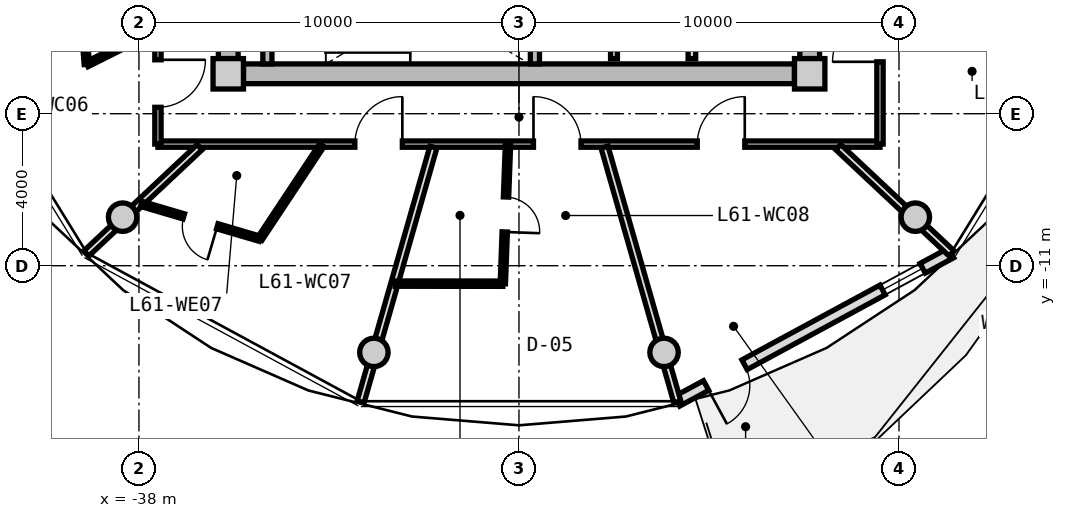
"""IFC4 building model, lengths in metres.
Left out: names, types, materials, properties, quantities, classifications, styles, units other than length and angle.
Written with IfcOpenShell. Run it as: python <this file> out.ifc"""

import sys

from ifc_helpers import new_model, si_unit, direction, frame, frame_2d, origin, origin_2d, place, context, subcontext, project, spatial, rectangle, circle, extrude, source, transform, mapped, element, fill, save


model = new_model("IFC4")
c1 = context("Model", 3, precision=1e-05, world=origin(), true_north=direction((0.0, 1.0)))
c2 = subcontext(c1, "Body", "Model", "MODEL_VIEW")
j1 = project(units=[si_unit("LENGTHUNIT", "METRE"), si_unit("PLANEANGLEUNIT", "RADIAN")], contexts=[c1])
p1 = place(None, origin())
s1 = spatial("IfcSite", under=j1, at=p1, CompositionType="ELEMENT")
p2 = place(p1, origin())
s2 = spatial("IfcBuilding", under=s1, at=p2, CompositionType="ELEMENT")
p3 = place(p2, frame((0.0, 0.0, 196.75)))
s3 = spatial("IfcBuildingStorey", under=s2, at=p3, CompositionType="ELEMENT", Elevation=196.75)
m1 = source(origin(), c2, "Body", "SweptSolid", [
    extrude(rectangle(XDim=0.8, YDim=0.8, at=origin_2d()), origin(), (0.0, 0.0, 1.0), 3.05),
])
for number, where, z_axis, x_axis in (
    (1, (-35.65, -5.95, 0.0), (0.0, 0.0, 1.0), (1.0, 0.0, 0.0)),
    (2, (-20.35, -5.95, 0.0), (0.0, 0.0, 1.0), (1.0, 0.0, 0.0)),
):
    element("IfcColumn", number, at=place(p3, frame(where, z_axis=z_axis, x_axis=x_axis)), inside=s3, PredefinedType="COLUMN", context=c2, shape_type="MappedRepresentation", body=[
        mapped(m1, transform((0.0, 0.0, 0.0), x_axis=(1.0, 0.0, 0.0), y_axis=(0.0, 1.0, 0.0), z_axis=(0.0, 0.0, 1.0), scale=1.0)),
    ])
m2 = source(origin(), c2, "Body", "SweptSolid", [
    extrude(rectangle(XDim=14.5, YDim=0.52, at=frame_2d((7.25, 0.0))), origin(), (0.0, 0.0, 1.0), 2.76),
])
p4 = place(p3, frame((-20.75, -5.95, 0.0), z_axis=(0.0, 0.0, 1.0), x_axis=(-1.0, 0.0, 0.0)))
e3 = element("IfcWall", 3, at=p4, inside=s3, PredefinedType="SHEAR", context=c2, shape_type="MappedRepresentation", body=[
    mapped(m2, transform((0.0, 0.0, 0.0), x_axis=(1.0, 0.0, 0.0), y_axis=(0.0, 1.0, 0.0), z_axis=(0.0, 0.0, 1.0), scale=1.0)),
])
m3 = source(origin(), c2, "Body", "SweptSolid", [
    extrude(rectangle(XDim=11.1, YDim=0.52, at=frame_2d((5.55, 0.0))), origin(), (0.0, 0.0, 1.0), 2.76),
])
p5 = place(p3, frame((-35.65, -5.55, 0.0), z_axis=(0.0, 0.0, 1.0), x_axis=(0.0, 1.0, 0.0)))
e4 = element("IfcWall", 4, at=p5, inside=s3, PredefinedType="SHEAR", context=c2, shape_type="MappedRepresentation", body=[
    mapped(m3, transform((0.0, 0.0, 0.0), x_axis=(1.0, 0.0, 0.0), y_axis=(0.0, 1.0, 0.0), z_axis=(0.0, 0.0, 1.0), scale=1.0)),
])
p6 = place(p5, frame((3.8, 0.0, 0.0)))
e5 = element("IfcOpeningElement", 5, at=p6, cuts=e4, PredefinedType="OPENING", context=c2, shape_type="SweptSolid", body=[
    extrude(rectangle(XDim=1.2, YDim=2.15, at=frame_2d((0.6, 1.075))), frame((0.0, 0.27, 0.0), z_axis=(0.0, -1.0, 0.0), x_axis=(1.0, 0.0, 0.0)), (0.0, 0.0, 1.0), 0.54),
])
p7 = place(p3, frame((-20.35, 5.55, 0.0), z_axis=(0.0, 0.0, 1.0), x_axis=(0.0, -1.0, 0.0)))
e6 = element("IfcWall", 6, at=p7, inside=s3, PredefinedType="SHEAR", context=c2, shape_type="MappedRepresentation", body=[
    mapped(m3, transform((0.0, 0.0, 0.0), x_axis=(1.0, 0.0, 0.0), y_axis=(0.0, 1.0, 0.0), z_axis=(0.0, 0.0, 1.0), scale=1.0)),
])
p8 = place(p7, frame((5.65, 0.0, 0.0)))
e7 = element("IfcOpeningElement", 7, at=p8, cuts=e6, PredefinedType="OPENING", context=c2, shape_type="SweptSolid", body=[
    extrude(rectangle(XDim=1.2, YDim=2.15, at=frame_2d((0.6, 1.075))), frame((0.0, 0.27, 0.0), z_axis=(0.0, -1.0, 0.0), x_axis=(1.0, 0.0, 0.0)), (0.0, 0.0, 1.0), 0.54),
])
m4 = source(origin(), c2, "Body", "SweptSolid", [
    extrude(circle(Radius=0.375, at=origin_2d()), origin(), (0.0, 0.0, 1.0), 3.05),
])
for number, where, z_axis, x_axis in (
    (8, (-38.43, -9.723, 0.0), (0.0, 0.0, 1.0), (1.0, 0.0, 0.0)),
    (9, (-31.818, -13.281, 0.0), (0.0, 0.0, 1.0), (1.0, 0.0, 0.0)),
    (10, (-24.182, -13.281, 0.0), (0.0, 0.0, 1.0), (1.0, 0.0, 0.0)),
    (11, (-17.57, -9.723, 0.0), (0.0, 0.0, 1.0), (1.0, 0.0, 0.0)),
):
    element("IfcColumn", number, at=place(p3, frame(where, z_axis=z_axis, x_axis=x_axis)), inside=s3, PredefinedType="COLUMN", context=c2, shape_type="MappedRepresentation", body=[
        mapped(m4, transform((0.0, 0.0, 0.0), x_axis=(1.0, 0.0, 0.0), y_axis=(0.0, 1.0, 0.0), z_axis=(0.0, 0.0, 1.0), scale=1.0)),
    ])
m5 = source(origin(), c2, "Body", "SweptSolid", [
    extrude(rectangle(XDim=8.197, YDim=0.29, at=frame_2d((4.099, 0.0))), origin(), (0.0, 0.0, 1.0), 2.76),
])
p9 = place(p3, frame((-16.63, -10.663, 0.0), z_axis=(0.0, 0.0, 1.0), x_axis=(-0.879369910001, -0.476139224791, 0.0)))
e12 = element("IfcWall", 12, at=p9, inside=s3, PredefinedType="SOLIDWALL", context=c2, shape_type="MappedRepresentation", body=[
    mapped(m5, transform((0.0, 0.0, 0.0), x_axis=(1.0, 0.0, 0.0), y_axis=(0.0, 1.0, 0.0), z_axis=(0.0, 0.0, 1.0), scale=1.0)),
])
p10 = place(p9, frame((6.18, 0.0, 0.0)))
e13 = element("IfcOpeningElement", 13, at=p10, cuts=e12, PredefinedType="OPENING", context=c2, shape_type="SweptSolid", body=[
    extrude(rectangle(XDim=1.15, YDim=2.25, at=frame_2d((0.575, 1.125))), frame((0.0, 0.155, 0.0), z_axis=(0.0, -1.0, 0.0), x_axis=(1.0, 0.0, 0.0)), (0.0, 0.0, 1.0), 0.31),
])
p11 = place(p9, frame((0.85, 0.0, 0.85)))
e14 = element("IfcOpeningElement", 14, at=p11, cuts=e12, PredefinedType="OPENING", context=c2, shape_type="SweptSolid", body=[
    extrude(rectangle(XDim=1.2, YDim=1.5, at=frame_2d((0.6, 0.75))), frame((0.0, 0.155, 0.0), z_axis=(0.0, -1.0, 0.0), x_axis=(1.0, 0.0, 0.0)), (0.0, 0.0, 1.0), 0.31),
])
m6 = source(origin(), c2, "Body", "SweptSolid", [
    extrude(rectangle(XDim=3.24, YDim=0.24, at=frame_2d((1.62, 0.0))), origin(), (0.0, 0.0, 1.0), 2.76),
])
for number, where, z_axis, x_axis in (
    (15, (-34.62, -5.69, 0.0), (0.0, 0.0, 1.0), (0.0, 1.0, 0.0)),
    (16, (-27.58, -5.69, 0.0), (0.0, 0.0, 1.0), (0.0, 1.0, 0.0)),
):
    element("IfcWall", number, at=place(p3, frame(where, z_axis=z_axis, x_axis=x_axis)), inside=s3, PredefinedType="PARTITIONING", context=c2, shape_type="MappedRepresentation", body=[
        mapped(m6, transform((0.0, 0.0, 0.0), x_axis=(1.0, 0.0, 0.0), y_axis=(0.0, 1.0, 0.0), z_axis=(0.0, 0.0, 1.0), scale=1.0)),
    ])
m7 = source(origin(), c2, "Body", "SweptSolid", [
    extrude(rectangle(XDim=3.8, YDim=0.2, at=frame_2d((1.9, 0.0))), origin(), (0.0, 0.0, 1.0), 2.745),
])
p12 = place(p3, frame((-23.45, -5.55, 0.0), z_axis=(0.0, 0.0, 1.0), x_axis=(0.0, 1.0, 0.0)))
e17 = element("IfcWall", 17, at=p12, inside=s3, PredefinedType="PARTITIONING", context=c2, shape_type="MappedRepresentation", body=[
    mapped(m7, transform((0.0, 0.0, 0.0), x_axis=(1.0, 0.0, 0.0), y_axis=(0.0, 1.0, 0.0), z_axis=(0.0, 0.0, 1.0), scale=1.0)),
])
m8 = source(origin(), c2, "Body", "SweptSolid", [
    extrude(rectangle(XDim=4.2, YDim=0.18, at=frame_2d((2.1, 0.0))), origin(), (0.0, 0.0, 1.0), 2.745),
])
p13 = place(p3, frame((-25.5, -5.55, 0.0), z_axis=(0.0, 0.0, 1.0), x_axis=(0.0, 1.0, 0.0)))
e18 = element("IfcWall", 18, at=p13, inside=s3, PredefinedType="PARTITIONING", context=c2, shape_type="MappedRepresentation", body=[
    mapped(m8, transform((0.0, 0.0, 0.0), x_axis=(1.0, 0.0, 0.0), y_axis=(0.0, 1.0, 0.0), z_axis=(0.0, 0.0, 1.0), scale=1.0)),
])
m9 = source(origin(), c2, "Body", "SweptSolid", [
    extrude(rectangle(XDim=19.0, YDim=0.165, at=frame_2d((9.5, 0.0))), origin(), (0.0, 0.0, 1.0), 2.745),
])
p14 = place(p3, frame((-18.5, -7.8, 0.0), z_axis=(0.0, 0.0, 1.0), x_axis=(-1.0, 0.0, 0.0)))
e19 = element("IfcWall", 19, at=p14, inside=s3, PredefinedType="PARTITIONING", context=c2, shape_type="MappedRepresentation", body=[
    mapped(m9, transform((0.0, 0.0, 0.0), x_axis=(1.0, 0.0, 0.0), y_axis=(0.0, 1.0, 0.0), z_axis=(0.0, 0.0, 1.0), scale=1.0)),
])
p15 = place(p14, frame((12.569, 0.0, 0.0)))
e20 = element("IfcOpeningElement", 20, at=p15, cuts=e19, PredefinedType="OPENING", context=c2, shape_type="SweptSolid", body=[
    extrude(rectangle(XDim=1.25, YDim=2.2, at=frame_2d((0.625, 1.1))), frame((0.0, 0.093, 0.0), z_axis=(0.0, -1.0, 0.0), x_axis=(1.0, 0.0, 0.0)), (0.0, 0.0, 1.0), 0.185),
])
p16 = place(p14, frame((7.868, 0.0, 0.0)))
e21 = element("IfcOpeningElement", 21, at=p16, cuts=e19, PredefinedType="OPENING", context=c2, shape_type="SweptSolid", body=[
    extrude(rectangle(XDim=1.25, YDim=2.2, at=frame_2d((0.625, 1.1))), frame((0.0, 0.093, 0.0), z_axis=(0.0, -1.0, 0.0), x_axis=(1.0, 0.0, 0.0)), (0.0, 0.0, 1.0), 0.185),
])
p17 = place(p14, frame((3.559, 0.0, 0.0)))
e22 = element("IfcOpeningElement", 22, at=p17, cuts=e19, PredefinedType="OPENING", context=c2, shape_type="SweptSolid", body=[
    extrude(rectangle(XDim=1.25, YDim=2.2, at=frame_2d((0.625, 1.1))), frame((0.0, 0.093, 0.0), z_axis=(0.0, -1.0, 0.0), x_axis=(1.0, 0.0, 0.0)), (0.0, 0.0, 1.0), 0.185),
])
m10 = source(origin(), c2, "Body", "SweptSolid", [
    extrude(rectangle(XDim=6.88, YDim=0.165, at=frame_2d((3.44, 0.0))), origin(), (0.0, 0.0, 1.0), 2.745),
])
p18 = place(p3, frame((-37.5, -7.8, 0.0), z_axis=(0.0, 0.0, 1.0), x_axis=(0.0, 1.0, 0.0)))
e23 = element("IfcWall", 23, at=p18, inside=s3, PredefinedType="PARTITIONING", context=c2, shape_type="MappedRepresentation", body=[
    mapped(m10, transform((0.0, 0.0, 0.0), x_axis=(1.0, 0.0, 0.0), y_axis=(0.0, 1.0, 0.0), z_axis=(0.0, 0.0, 1.0), scale=1.0)),
])
p19 = place(p18, frame((0.968, 0.0, 0.0)))
e24 = element("IfcOpeningElement", 24, at=p19, cuts=e23, PredefinedType="OPENING", context=c2, shape_type="SweptSolid", body=[
    extrude(rectangle(XDim=1.25, YDim=2.2, at=frame_2d((0.625, 1.1))), frame((0.0, 0.093, 0.0), z_axis=(0.0, -1.0, 0.0), x_axis=(1.0, 0.0, 0.0)), (0.0, 0.0, 1.0), 0.185),
])
p20 = place(p3, frame((-18.5, -0.92, 0.0), z_axis=(0.0, 0.0, 1.0), x_axis=(0.0, -1.0, 0.0)))
e25 = element("IfcWall", 25, at=p20, inside=s3, PredefinedType="PARTITIONING", context=c2, shape_type="MappedRepresentation", body=[
    mapped(m10, transform((0.0, 0.0, 0.0), x_axis=(1.0, 0.0, 0.0), y_axis=(0.0, 1.0, 0.0), z_axis=(0.0, 0.0, 1.0), scale=1.0)),
])
p21 = place(p20, frame((3.464, 0.0, 0.0)))
e26 = element("IfcOpeningElement", 26, at=p21, cuts=e25, PredefinedType="OPENING", context=c2, shape_type="SweptSolid", body=[
    extrude(rectangle(XDim=1.25, YDim=2.2, at=frame_2d((0.625, 1.1))), frame((0.0, 0.093, 0.0), z_axis=(0.0, -1.0, 0.0), x_axis=(1.0, 0.0, 0.0)), (0.0, 0.0, 1.0), 0.185),
])
m11 = source(origin(), c2, "Body", "SweptSolid", [
    extrude(rectangle(XDim=4.089, YDim=0.19, at=frame_2d((2.044, 0.0))), origin(), (0.0, 0.0, 1.0), 2.345),
])
p22 = place(p3, frame((-36.402, -7.88, 0.0), z_axis=(0.0, 0.0, 1.0), x_axis=(-0.729401273609, -0.684086092577, 0.0)))
e27 = element("IfcWall", 27, at=p22, inside=s3, PredefinedType="PARTITIONING", context=c2, shape_type="MappedRepresentation", body=[
    mapped(m11, transform((0.0, 0.0, 0.0), x_axis=(1.0, 0.0, 0.0), y_axis=(0.0, 1.0, 0.0), z_axis=(0.0, 0.0, 1.0), scale=1.0)),
])
m12 = source(origin(), c2, "Body", "SweptSolid", [
    extrude(rectangle(XDim=2.06, YDim=0.14, at=frame_2d((1.03, 0.0))), origin(), (0.0, 0.0, 1.0), 2.745),
])
p23 = place(p3, frame((-37.53, -4.778, 0.0), z_axis=(0.0, 0.0, 1.0), x_axis=(-0.893952568722, -0.448161583444, 0.0)))
e28 = element("IfcWall", 28, at=p23, inside=s3, PredefinedType="PARTITIONING", context=c2, shape_type="MappedRepresentation", body=[
    mapped(m12, transform((0.0, 0.0, 0.0), x_axis=(1.0, 0.0, 0.0), y_axis=(0.0, 1.0, 0.0), z_axis=(0.0, 0.0, 1.0), scale=1.0)),
])
m13 = source(origin(), c2, "Body", "SweptSolid", [
    extrude(rectangle(XDim=2.798, YDim=0.14, at=frame_2d((1.399, 0.0))), origin(), (0.0, 0.0, 1.0), 2.745),
])
p24 = place(p3, frame((-39.371, -5.701, 0.0), z_axis=(0.0, 0.0, 1.0), x_axis=(-0.077823984089, 0.996967114553, 0.0)))
e29 = element("IfcWall", 29, at=p24, inside=s3, PredefinedType="PARTITIONING", context=c2, shape_type="MappedRepresentation", body=[
    mapped(m13, transform((0.0, 0.0, 0.0), x_axis=(1.0, 0.0, 0.0), y_axis=(0.0, 1.0, 0.0), z_axis=(0.0, 0.0, 1.0), scale=1.0)),
])
p25 = place(p24, frame((0.939, 0.0, 0.0)))
e30 = element("IfcOpeningElement", 30, at=p25, cuts=e29, PredefinedType="OPENING", context=c2, shape_type="SweptSolid", body=[
    extrude(rectangle(XDim=0.92, YDim=2.1, at=frame_2d((0.46, 1.05))), frame((0.0, 0.08, 0.0), z_axis=(0.0, -1.0, 0.0), x_axis=(1.0, 0.0, 0.0)), (0.0, 0.0, 1.0), 0.16),
])
m14 = source(origin(), c2, "Body", "SweptSolid", [
    extrude(rectangle(XDim=6.974, YDim=0.19, at=frame_2d((3.487, 0.0))), origin(), (0.0, 0.0, 1.0), 2.345),
])
p26 = place(p3, frame((-30.251, -7.88, 0.0), z_axis=(0.0, 0.0, 1.0), x_axis=(-0.274707256801, -0.961527910703, 0.0)))
e31 = element("IfcWall", 31, at=p26, inside=s3, PredefinedType="PARTITIONING", context=c2, shape_type="MappedRepresentation", body=[
    mapped(m14, transform((0.0, 0.0, 0.0), x_axis=(1.0, 0.0, 0.0), y_axis=(0.0, 1.0, 0.0), z_axis=(0.0, 0.0, 1.0), scale=1.0)),
])
m15 = source(origin(), c2, "Body", "SweptSolid", [
    extrude(rectangle(XDim=2.953, YDim=0.14, at=frame_2d((1.476, 0.0))), origin(), (0.0, 0.0, 1.0), 2.745),
])
p27 = place(p3, frame((-33.188, -7.83, 0.0), z_axis=(0.0, 0.0, 1.0), x_axis=(-0.552427436518, -0.833560991999, 0.0)))
e32 = element("IfcWall", 32, at=p27, inside=s3, PredefinedType="PARTITIONING", context=c2, shape_type="MappedRepresentation", body=[
    mapped(m15, transform((0.0, 0.0, 0.0), x_axis=(1.0, 0.0, 0.0), y_axis=(0.0, 1.0, 0.0), z_axis=(0.0, 0.0, 1.0), scale=1.0)),
])
m16 = source(origin(), c2, "Body", "SweptSolid", [
    extrude(rectangle(XDim=3.252, YDim=0.14, at=frame_2d((1.626, 0.0))), origin(), (0.0, 0.0, 1.0), 2.745),
])
p28 = place(p3, frame((-34.82, -10.291, 0.0), z_axis=(0.0, 0.0, 1.0), x_axis=(-0.959294945864, 0.282406102695, 0.0)))
e33 = element("IfcWall", 33, at=p28, inside=s3, PredefinedType="PARTITIONING", context=c2, shape_type="MappedRepresentation", body=[
    mapped(m16, transform((0.0, 0.0, 0.0), x_axis=(1.0, 0.0, 0.0), y_axis=(0.0, 1.0, 0.0), z_axis=(0.0, 0.0, 1.0), scale=1.0)),
])
p29 = place(p28, frame((1.166, 0.0, 0.0)))
e34 = element("IfcOpeningElement", 34, at=p29, cuts=e33, PredefinedType="OPENING", context=c2, shape_type="SweptSolid", body=[
    extrude(rectangle(XDim=0.92, YDim=2.1, at=frame_2d((0.46, 1.05))), frame((0.0, 0.08, 0.0), z_axis=(0.0, -1.0, 0.0), x_axis=(1.0, 0.0, 0.0)), (0.0, 0.0, 1.0), 0.16),
])
p30 = place(p3, frame((-25.749, -7.88, 0.0), z_axis=(0.0, 0.0, 1.0), x_axis=(0.274707256801, -0.961527910703, 0.0)))
e35 = element("IfcWall", 35, at=p30, inside=s3, PredefinedType="PARTITIONING", context=c2, shape_type="MappedRepresentation", body=[
    mapped(m14, transform((0.0, 0.0, 0.0), x_axis=(1.0, 0.0, 0.0), y_axis=(0.0, 1.0, 0.0), z_axis=(0.0, 0.0, 1.0), scale=1.0)),
])
m17 = source(origin(), c2, "Body", "SweptSolid", [
    extrude(rectangle(XDim=3.646, YDim=0.14, at=frame_2d((1.823, 0.0))), origin(), (0.0, 0.0, 1.0), 2.745),
])
p31 = place(p3, frame((-28.29, -7.83, 0.0), z_axis=(0.0, 0.0, 1.0), x_axis=(-0.036962128131, -0.99931666707, 0.0)))
e36 = element("IfcWall", 36, at=p31, inside=s3, PredefinedType="PARTITIONING", context=c2, shape_type="MappedRepresentation", body=[
    mapped(m17, transform((0.0, 0.0, 0.0), x_axis=(1.0, 0.0, 0.0), y_axis=(0.0, 1.0, 0.0), z_axis=(0.0, 0.0, 1.0), scale=1.0)),
])
p32 = place(p31, frame((1.363, 0.0, 0.0)))
e37 = element("IfcOpeningElement", 37, at=p32, cuts=e36, PredefinedType="OPENING", context=c2, shape_type="SweptSolid", body=[
    extrude(rectangle(XDim=0.92, YDim=2.1, at=frame_2d((0.46, 1.05))), frame((0.0, 0.08, 0.0), z_axis=(0.0, -1.0, 0.0), x_axis=(1.0, 0.0, 0.0)), (0.0, 0.0, 1.0), 0.16),
])
m18 = source(origin(), c2, "Body", "SweptSolid", [
    extrude(rectangle(XDim=2.835, YDim=0.14, at=frame_2d((1.417, 0.0))), origin(), (0.0, 0.0, 1.0), 2.745),
])
p33 = place(p3, frame((-28.425, -11.474, 0.0), z_axis=(0.0, 0.0, 1.0), x_axis=(-0.999999699589, 0.000775126802, 0.0)))
e38 = element("IfcWall", 38, at=p33, inside=s3, PredefinedType="PARTITIONING", context=c2, shape_type="MappedRepresentation", body=[
    mapped(m18, transform((0.0, 0.0, 0.0), x_axis=(1.0, 0.0, 0.0), y_axis=(0.0, 1.0, 0.0), z_axis=(0.0, 0.0, 1.0), scale=1.0)),
])
p34 = place(p3, frame((-19.598, -7.88, 0.0), z_axis=(0.0, 0.0, 1.0), x_axis=(0.729401273609, -0.684086092577, 0.0)))
e39 = element("IfcWall", 39, at=p34, inside=s3, PredefinedType="PARTITIONING", context=c2, shape_type="MappedRepresentation", body=[
    mapped(m11, transform((0.0, 0.0, 0.0), x_axis=(1.0, 0.0, 0.0), y_axis=(0.0, 1.0, 0.0), z_axis=(0.0, 0.0, 1.0), scale=1.0)),
])
m19 = source(origin(), c2, "Body", "SweptSolid", [
    extrude(rectangle(XDim=1.15, YDim=2.25, at=frame_2d((0.575, 1.125))), frame((0.0, 0.025, 0.0), z_axis=(0.0, -1.0, 0.0), x_axis=(1.0, 0.0, 0.0)), (0.0, 0.0, 1.0), 0.05),
])
p35 = place(p10, origin())
e40 = element("IfcDoor", 40, at=p35, inside=s3, OperationType="SINGLE_SWING_RIGHT", PredefinedType="DOOR", context=c2, shape_type="MappedRepresentation", body=[
    mapped(m19, transform((0.0, 0.0, 0.0), x_axis=(1.0, 0.0, 0.0), y_axis=(0.0, 1.0, 0.0), z_axis=(0.0, 0.0, 1.0), scale=1.0)),
])
fill(e13, e40)
m20 = source(origin(), c2, "Body", "SweptSolid", [
    extrude(rectangle(XDim=1.2, YDim=1.5, at=frame_2d((0.6, 0.75))), frame((0.0, 0.03, 0.0), z_axis=(0.0, -1.0, 0.0), x_axis=(1.0, 0.0, 0.0)), (0.0, 0.0, 1.0), 0.06),
])
p36 = place(p11, origin())
e41 = element("IfcWindow", 41, at=p36, inside=s3, PartitioningType="SINGLE_PANEL", PredefinedType="WINDOW", context=c2, shape_type="MappedRepresentation", body=[
    mapped(m20, transform((0.0, 0.0, 0.0), x_axis=(1.0, 0.0, 0.0), y_axis=(0.0, 1.0, 0.0), z_axis=(0.0, 0.0, 1.0), scale=1.0)),
])
fill(e14, e41)
m21 = source(origin(), c2, "Body", "SweptSolid", [
    extrude(rectangle(XDim=1.25, YDim=2.2, at=frame_2d((0.625, 1.1))), frame((0.0, 0.025, 0.0), z_axis=(0.0, -1.0, 0.0), x_axis=(1.0, 0.0, 0.0)), (0.0, 0.0, 1.0), 0.05),
])
p37 = place(p19, frame((1.25, 0.0, 0.0), z_axis=(0.0, 0.0, 1.0), x_axis=(-1.0, 0.0, 0.0)))
e42 = element("IfcDoor", 42, at=p37, inside=s3, OperationType="SINGLE_SWING_LEFT", PredefinedType="DOOR", context=c2, shape_type="MappedRepresentation", body=[
    mapped(m21, transform((0.0, 0.0, 0.0), x_axis=(1.0, 0.0, 0.0), y_axis=(0.0, 1.0, 0.0), z_axis=(0.0, 0.0, 1.0), scale=1.0)),
])
fill(e24, e42)
p38 = place(p15, frame((1.25, 0.0, 0.0), z_axis=(0.0, 0.0, 1.0), x_axis=(-1.0, 0.0, 0.0)))
e43 = element("IfcDoor", 43, at=p38, inside=s3, OperationType="SINGLE_SWING_RIGHT", PredefinedType="DOOR", context=c2, shape_type="MappedRepresentation", body=[
    mapped(m21, transform((0.0, 0.0, 0.0), x_axis=(1.0, 0.0, 0.0), y_axis=(0.0, 1.0, 0.0), z_axis=(0.0, 0.0, 1.0), scale=1.0)),
])
fill(e20, e43)
m22 = source(origin(), c2, "Body", "SweptSolid", [
    extrude(rectangle(XDim=0.92, YDim=2.1, at=frame_2d((0.46, 1.05))), frame((0.0, 0.025, 0.0), z_axis=(0.0, -1.0, 0.0), x_axis=(1.0, 0.0, 0.0)), (0.0, 0.0, 1.0), 0.05),
])
p39 = place(p29, origin())
e44 = element("IfcDoor", 44, at=p39, inside=s3, OperationType="SINGLE_SWING_LEFT", PredefinedType="DOOR", context=c2, shape_type="MappedRepresentation", body=[
    mapped(m22, transform((0.0, 0.0, 0.0), x_axis=(1.0, 0.0, 0.0), y_axis=(0.0, 1.0, 0.0), z_axis=(0.0, 0.0, 1.0), scale=1.0)),
])
fill(e34, e44)
p40 = place(p16, frame((1.25, 0.0, 0.0), z_axis=(0.0, 0.0, 1.0), x_axis=(-1.0, 0.0, 0.0)))
e45 = element("IfcDoor", 45, at=p40, inside=s3, OperationType="SINGLE_SWING_LEFT", PredefinedType="DOOR", context=c2, shape_type="MappedRepresentation", body=[
    mapped(m21, transform((0.0, 0.0, 0.0), x_axis=(1.0, 0.0, 0.0), y_axis=(0.0, 1.0, 0.0), z_axis=(0.0, 0.0, 1.0), scale=1.0)),
])
fill(e21, e45)
p41 = place(p32, origin())
e46 = element("IfcDoor", 46, at=p41, inside=s3, OperationType="SINGLE_SWING_RIGHT", PredefinedType="DOOR", context=c2, shape_type="MappedRepresentation", body=[
    mapped(m22, transform((0.0, 0.0, 0.0), x_axis=(1.0, 0.0, 0.0), y_axis=(0.0, 1.0, 0.0), z_axis=(0.0, 0.0, 1.0), scale=1.0)),
])
fill(e37, e46)
p42 = place(p17, frame((1.25, 0.0, 0.0), z_axis=(0.0, 0.0, 1.0), x_axis=(-1.0, 0.0, 0.0)))
e47 = element("IfcDoor", 47, at=p42, inside=s3, OperationType="SINGLE_SWING_RIGHT", PredefinedType="DOOR", context=c2, shape_type="MappedRepresentation", body=[
    mapped(m21, transform((0.0, 0.0, 0.0), x_axis=(1.0, 0.0, 0.0), y_axis=(0.0, 1.0, 0.0), z_axis=(0.0, 0.0, 1.0), scale=1.0)),
])
fill(e22, e47)
p43 = place(p21, frame((1.25, 0.0, 0.0), z_axis=(0.0, 0.0, 1.0), x_axis=(-1.0, 0.0, 0.0)))
e48 = element("IfcDoor", 48, at=p43, inside=s3, OperationType="SINGLE_SWING_LEFT", PredefinedType="DOOR", context=c2, shape_type="MappedRepresentation", body=[
    mapped(m21, transform((0.0, 0.0, 0.0), x_axis=(1.0, 0.0, 0.0), y_axis=(0.0, 1.0, 0.0), z_axis=(0.0, 0.0, 1.0), scale=1.0)),
])
fill(e26, e48)
save(model, sys.argv[1])
